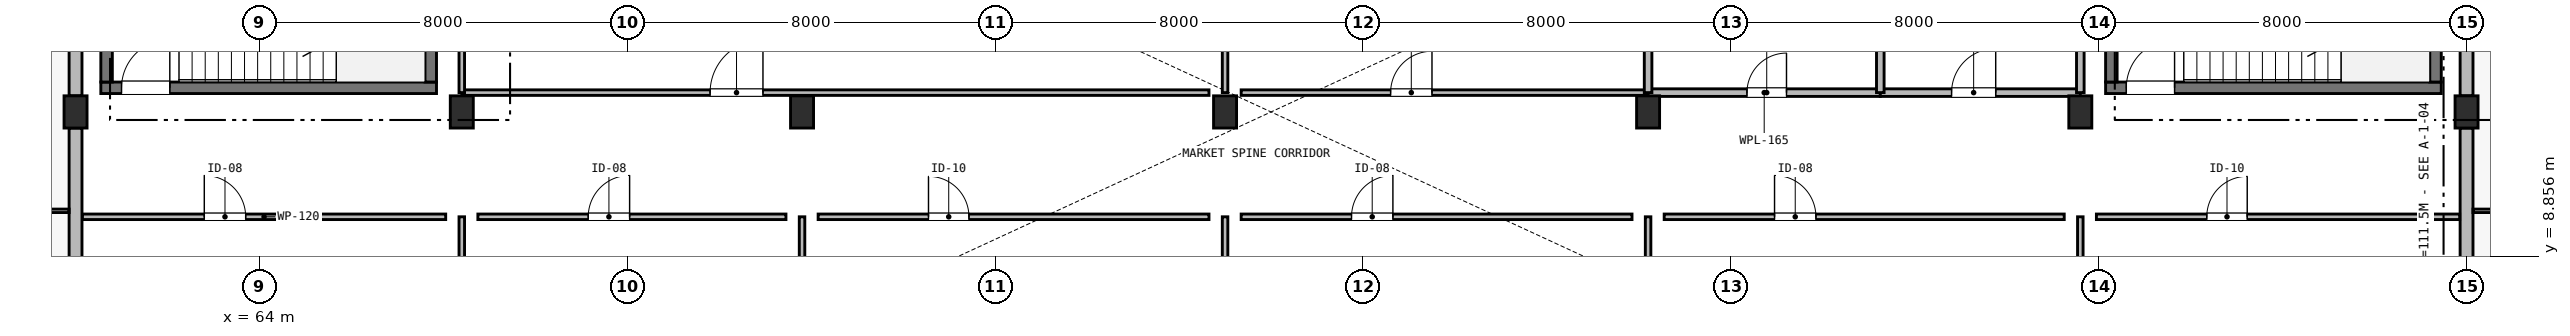
"""IFC4 building model, lengths in metres.
Left out: names, types, materials, properties, quantities, classifications, styles, units other than length and angle.
Written with IfcOpenShell. Run it as: python <this file> out.ifc"""

import sys

from ifc_helpers import new_model, si_unit, direction, frame, frame_2d, origin, origin_2d, place, context, subcontext, project, spatial, rectangle, extrude, element, fill, save


model = new_model("IFC4")
c1 = context("Model", 3, precision=1e-05, world=origin(), true_north=direction((0.0, 1.0)))
c2 = subcontext(c1, "Body", "Model", "MODEL_VIEW")
j1 = project(units=[si_unit("LENGTHUNIT", "METRE"), si_unit("PLANEANGLEUNIT", "RADIAN")], contexts=[c1])
p1 = place(None, origin())
s1 = spatial("IfcSite", under=j1, at=p1, CompositionType="ELEMENT")
p2 = place(p1, origin())
s2 = spatial("IfcBuilding", under=s1, at=p2, CompositionType="ELEMENT")
p3 = place(p2, origin())
s3 = spatial("IfcBuildingStorey", under=s2, at=p3, CompositionType="ELEMENT", Elevation=0.0)
p4 = place(p3, frame((60.55, 12.525, 0.0), z_axis=(0.0, 0.0, 1.0), x_axis=(1.0, 0.0, 0.0)))
e1 = element("IfcWall", 1, at=p4, inside=s3, PredefinedType="SHEAR", context=c2, shape_type="SweptSolid", body=[
    extrude(rectangle(XDim=7.3, YDim=0.25, at=frame_2d((3.65, 0.0))), origin(), (0.0, 0.0, 1.0), 4.5),
])
p5 = place(p4, frame((0.45, 0.0, 0.0)))
e2 = element("IfcOpeningElement", 2, at=p5, cuts=e1, PredefinedType="OPENING", context=c2, shape_type="SweptSolid", body=[
    extrude(rectangle(XDim=1.05, YDim=2.15, at=frame_2d((0.525, 1.075))), frame((0.0, 0.14, 0.0), z_axis=(0.0, -1.0, 0.0), x_axis=(1.0, 0.0, 0.0)), (0.0, 0.0, 1.0), 0.28),
])
for number, where, z_axis, x_axis in (
    (3, (60.675, 12.65, 0.0), (0.0, 0.0, 1.0), (0.0, 1.0, 0.0)),
    (4, (67.725, 12.65, 0.0), (0.0, 0.0, 1.0), (0.0, 1.0, 0.0)),
):
    element("IfcWall", number, at=place(p3, frame(where, z_axis=z_axis, x_axis=x_axis)), inside=s3, PredefinedType="SHEAR", context=c2, shape_type="SweptSolid", body=[
        extrude(rectangle(XDim=2.85, YDim=0.25, at=frame_2d((1.425, 0.0))), origin(), (0.0, 0.0, 1.0), 4.5),
    ])
p6 = place(p3, frame((104.15, 12.525, 0.0), z_axis=(0.0, 0.0, 1.0), x_axis=(1.0, 0.0, 0.0)))
e5 = element("IfcWall", 5, at=p6, inside=s3, PredefinedType="SHEAR", context=c2, shape_type="SweptSolid", body=[
    extrude(rectangle(XDim=7.3, YDim=0.25, at=frame_2d((3.65, 0.0))), origin(), (0.0, 0.0, 1.0), 4.5),
])
p7 = place(p6, frame((0.45, 0.0, 0.0)))
e6 = element("IfcOpeningElement", 6, at=p7, cuts=e5, PredefinedType="OPENING", context=c2, shape_type="SweptSolid", body=[
    extrude(rectangle(XDim=1.05, YDim=2.15, at=frame_2d((0.525, 1.075))), frame((0.0, 0.14, 0.0), z_axis=(0.0, -1.0, 0.0), x_axis=(1.0, 0.0, 0.0)), (0.0, 0.0, 1.0), 0.28),
])
for number, where, z_axis, x_axis in (
    (7, (104.275, 12.65, 0.0), (0.0, 0.0, 1.0), (0.0, 1.0, 0.0)),
    (8, (111.325, 12.65, 0.0), (0.0, 0.0, 1.0), (0.0, 1.0, 0.0)),
):
    element("IfcWall", number, at=place(p3, frame(where, z_axis=z_axis, x_axis=x_axis)), inside=s3, PredefinedType="SHEAR", context=c2, shape_type="SweptSolid", body=[
        extrude(rectangle(XDim=2.85, YDim=0.25, at=frame_2d((1.425, 0.0))), origin(), (0.0, 0.0, 1.0), 4.5),
    ])
for number, where, z_axis, x_axis in (
    (9, (60.0, 12.0, 0.0), (0.0, 0.0, 1.0), (1.0, 0.0, 0.0)),
    (10, (68.4, 12.0, 0.0), (0.0, 0.0, 1.0), (1.0, 0.0, 0.0)),
    (11, (75.8, 12.0, 0.0), (0.0, 0.0, 1.0), (1.0, 0.0, 0.0)),
    (12, (85.0, 12.0, 0.0), (0.0, 0.0, 1.0), (1.0, 0.0, 0.0)),
    (13, (94.2, 12.0, 0.0), (0.0, 0.0, 1.0), (1.0, 0.0, 0.0)),
    (14, (103.6, 12.0, 0.0), (0.0, 0.0, 1.0), (1.0, 0.0, 0.0)),
    (15, (112.0, 12.0, 0.0), (0.0, 0.0, 1.0), (1.0, 0.0, 0.0)),
):
    element("IfcColumn", number, at=place(p3, frame(where, z_axis=z_axis, x_axis=x_axis)), inside=s3, PredefinedType="COLUMN", context=c2, shape_type="SweptSolid", body=[
        extrude(rectangle(XDim=0.5, YDim=0.7, at=origin_2d()), origin(), (0.0, 0.0, 1.0), 4.5),
    ])
p8 = place(p3, frame((60.0, 0.35, 0.0), z_axis=(0.0, 0.0, 1.0), x_axis=(0.0, 1.0, 0.0)))
e16 = element("IfcWall", 16, at=p8, inside=s3, PredefinedType="SOLIDWALL", context=c2, shape_type="SweptSolid", body=[
    extrude(rectangle(XDim=11.3, YDim=0.28, at=frame_2d((5.65, 0.0))), origin(), (0.0, 0.0, 1.0), 3.59),
])
p9 = place(p8, frame((3.0, 0.0, 0.0)))
e17 = element("IfcOpeningElement", 17, at=p9, cuts=e16, PredefinedType="OPENING", context=c2, shape_type="SweptSolid", body=[
    extrude(rectangle(XDim=1.4, YDim=2.2, at=frame_2d((0.7, 1.1))), frame((0.0, 0.155, 0.0), z_axis=(0.0, -1.0, 0.0), x_axis=(1.0, 0.0, 0.0)), (0.0, 0.0, 1.0), 0.31),
])
p10 = place(p3, frame((60.0, 12.35, 0.0), z_axis=(0.0, 0.0, 1.0), x_axis=(0.0, 1.0, 0.0)))
e18 = element("IfcWall", 18, at=p10, inside=s3, PredefinedType="SOLIDWALL", context=c2, shape_type="SweptSolid", body=[
    extrude(rectangle(XDim=11.3, YDim=0.28, at=frame_2d((5.65, 0.0))), origin(), (0.0, 0.0, 1.0), 3.59),
])
p11 = place(p10, frame((5.3, 0.0, 0.42)))
e19 = element("IfcOpeningElement", 19, at=p11, cuts=e18, PredefinedType="OPENING", context=c2, shape_type="SweptSolid", body=[
    extrude(rectangle(XDim=0.7, YDim=2.14, at=frame_2d((0.35, 1.07))), frame((0.0, 0.155, 0.0), z_axis=(0.0, -1.0, 0.0), x_axis=(1.0, 0.0, 0.0)), (0.0, 0.0, 1.0), 0.31),
])
p12 = place(p3, frame((112.0, 11.65, 0.0), z_axis=(0.0, 0.0, 1.0), x_axis=(0.0, -1.0, 0.0)))
e20 = element("IfcWall", 20, at=p12, inside=s3, PredefinedType="SOLIDWALL", context=c2, shape_type="SweptSolid", body=[
    extrude(rectangle(XDim=11.3, YDim=0.28, at=frame_2d((5.65, 0.0))), origin(), (0.0, 0.0, 1.0), 3.59),
])
p13 = place(p12, frame((5.3, 0.0, 0.42)))
e21 = element("IfcOpeningElement", 21, at=p13, cuts=e20, PredefinedType="OPENING", context=c2, shape_type="SweptSolid", body=[
    extrude(rectangle(XDim=0.7, YDim=2.14, at=frame_2d((0.35, 1.07))), frame((0.0, 0.155, 0.0), z_axis=(0.0, -1.0, 0.0), x_axis=(1.0, 0.0, 0.0)), (0.0, 0.0, 1.0), 0.31),
])
p14 = place(p3, frame((112.0, 23.65, 0.0), z_axis=(0.0, 0.0, 1.0), x_axis=(0.0, -1.0, 0.0)))
e22 = element("IfcWall", 22, at=p14, inside=s3, PredefinedType="SOLIDWALL", context=c2, shape_type="SweptSolid", body=[
    extrude(rectangle(XDim=11.3, YDim=0.28, at=frame_2d((5.65, 0.0))), origin(), (0.0, 0.0, 1.0), 3.59),
])
p15 = place(p14, frame((5.3, 0.0, 0.42)))
e23 = element("IfcOpeningElement", 23, at=p15, cuts=e22, PredefinedType="OPENING", context=c2, shape_type="SweptSolid", body=[
    extrude(rectangle(XDim=0.7, YDim=2.14, at=frame_2d((0.35, 1.07))), frame((0.0, 0.155, 0.0), z_axis=(0.0, -1.0, 0.0), x_axis=(1.0, 0.0, 0.0)), (0.0, 0.0, 1.0), 0.31),
])
p16 = place(p3, frame((60.15, 9.72, 0.0), z_axis=(0.0, 0.0, 1.0), x_axis=(1.0, 0.0, 0.0)))
e24 = element("IfcWall", 24, at=p16, inside=s3, PredefinedType="PARTITIONING", context=c2, shape_type="SweptSolid", body=[
    extrude(rectangle(XDim=7.9, YDim=0.12, at=frame_2d((3.95, 0.0))), origin(), (0.0, 0.0, 1.0), 4.23),
])
p17 = place(p16, frame((2.65, 0.0, 0.0)))
e25 = element("IfcOpeningElement", 25, at=p17, cuts=e24, PredefinedType="OPENING", context=c2, shape_type="SweptSolid", body=[
    extrude(rectangle(XDim=0.9, YDim=2.1, at=frame_2d((0.45, 1.05))), frame((0.0, 0.075, 0.0), z_axis=(0.0, -1.0, 0.0), x_axis=(1.0, 0.0, 0.0)), (0.0, 0.0, 1.0), 0.15),
])
p18 = place(p3, frame((68.75, 9.72, 0.0), z_axis=(0.0, 0.0, 1.0), x_axis=(1.0, 0.0, 0.0)))
e26 = element("IfcWall", 26, at=p18, inside=s3, PredefinedType="PARTITIONING", context=c2, shape_type="SweptSolid", body=[
    extrude(rectangle(XDim=6.7, YDim=0.12, at=frame_2d((3.35, 0.0))), origin(), (0.0, 0.0, 1.0), 4.23),
])
p19 = place(p18, frame((2.4, 0.0, 0.0)))
e27 = element("IfcOpeningElement", 27, at=p19, cuts=e26, PredefinedType="OPENING", context=c2, shape_type="SweptSolid", body=[
    extrude(rectangle(XDim=0.9, YDim=2.1, at=frame_2d((0.45, 1.05))), frame((0.0, 0.075, 0.0), z_axis=(0.0, -1.0, 0.0), x_axis=(1.0, 0.0, 0.0)), (0.0, 0.0, 1.0), 0.15),
])
p20 = place(p3, frame((76.15, 9.72, 0.0), z_axis=(0.0, 0.0, 1.0), x_axis=(1.0, 0.0, 0.0)))
e28 = element("IfcWall", 28, at=p20, inside=s3, PredefinedType="PARTITIONING", context=c2, shape_type="SweptSolid", body=[
    extrude(rectangle(XDim=8.5, YDim=0.12, at=frame_2d((4.25, 0.0))), origin(), (0.0, 0.0, 1.0), 4.23),
])
p21 = place(p20, frame((2.4, 0.0, 0.0)))
e29 = element("IfcOpeningElement", 29, at=p21, cuts=e28, PredefinedType="OPENING", context=c2, shape_type="SweptSolid", body=[
    extrude(rectangle(XDim=0.88, YDim=2.1, at=frame_2d((0.44, 1.05))), frame((0.0, 0.075, 0.0), z_axis=(0.0, -1.0, 0.0), x_axis=(1.0, 0.0, 0.0)), (0.0, 0.0, 1.0), 0.15),
])
p22 = place(p3, frame((85.35, 9.72, 0.0), z_axis=(0.0, 0.0, 1.0), x_axis=(1.0, 0.0, 0.0)))
e30 = element("IfcWall", 30, at=p22, inside=s3, PredefinedType="PARTITIONING", context=c2, shape_type="SweptSolid", body=[
    extrude(rectangle(XDim=8.5, YDim=0.12, at=frame_2d((4.25, 0.0))), origin(), (0.0, 0.0, 1.0), 4.23),
])
p23 = place(p22, frame((2.4, 0.0, 0.0)))
e31 = element("IfcOpeningElement", 31, at=p23, cuts=e30, PredefinedType="OPENING", context=c2, shape_type="SweptSolid", body=[
    extrude(rectangle(XDim=0.9, YDim=2.1, at=frame_2d((0.45, 1.05))), frame((0.0, 0.075, 0.0), z_axis=(0.0, -1.0, 0.0), x_axis=(1.0, 0.0, 0.0)), (0.0, 0.0, 1.0), 0.15),
])
p24 = place(p3, frame((94.55, 9.72, 0.0), z_axis=(0.0, 0.0, 1.0), x_axis=(1.0, 0.0, 0.0)))
e32 = element("IfcWall", 32, at=p24, inside=s3, PredefinedType="PARTITIONING", context=c2, shape_type="SweptSolid", body=[
    extrude(rectangle(XDim=8.7, YDim=0.12, at=frame_2d((4.35, 0.0))), origin(), (0.0, 0.0, 1.0), 4.23),
])
p25 = place(p24, frame((2.4, 0.0, 0.0)))
e33 = element("IfcOpeningElement", 33, at=p25, cuts=e32, PredefinedType="OPENING", context=c2, shape_type="SweptSolid", body=[
    extrude(rectangle(XDim=0.9, YDim=2.1, at=frame_2d((0.45, 1.05))), frame((0.0, 0.075, 0.0), z_axis=(0.0, -1.0, 0.0), x_axis=(1.0, 0.0, 0.0)), (0.0, 0.0, 1.0), 0.15),
])
p26 = place(p3, frame((103.95, 9.72, 0.0), z_axis=(0.0, 0.0, 1.0), x_axis=(1.0, 0.0, 0.0)))
e34 = element("IfcWall", 34, at=p26, inside=s3, PredefinedType="PARTITIONING", context=c2, shape_type="SweptSolid", body=[
    extrude(rectangle(XDim=7.9, YDim=0.12, at=frame_2d((3.95, 0.0))), origin(), (0.0, 0.0, 1.0), 4.23),
])
p27 = place(p26, frame((2.4, 0.0, 0.0)))
e35 = element("IfcOpeningElement", 35, at=p27, cuts=e34, PredefinedType="OPENING", context=c2, shape_type="SweptSolid", body=[
    extrude(rectangle(XDim=0.88, YDim=2.1, at=frame_2d((0.44, 1.05))), frame((0.0, 0.075, 0.0), z_axis=(0.0, -1.0, 0.0), x_axis=(1.0, 0.0, 0.0)), (0.0, 0.0, 1.0), 0.15),
])
for number, where, z_axis, x_axis in (
    (36, (68.4, 0.12, 0.0), (0.0, 0.0, 1.0), (0.0, 1.0, 0.0)),
    (37, (75.8, 0.12, 0.0), (0.0, 0.0, 1.0), (0.0, 1.0, 0.0)),
    (38, (85.0, 0.12, 0.0), (0.0, 0.0, 1.0), (0.0, 1.0, 0.0)),
    (39, (94.2, 0.12, 0.0), (0.0, 0.0, 1.0), (0.0, 1.0, 0.0)),
    (40, (103.6, 0.12, 0.0), (0.0, 0.0, 1.0), (0.0, 1.0, 0.0)),
):
    element("IfcWall", number, at=place(p3, frame(where, z_axis=z_axis, x_axis=x_axis)), inside=s3, PredefinedType="PARTITIONING", context=c2, shape_type="SweptSolid", body=[
        extrude(rectangle(XDim=9.6, YDim=0.12, at=frame_2d((4.8, 0.0))), origin(), (0.0, 0.0, 1.0), 3.6),
    ])
p28 = place(p3, frame((68.4, 12.42, 0.0), z_axis=(0.0, 0.0, 1.0), x_axis=(1.0, 0.0, 0.0)))
e41 = element("IfcWall", 41, at=p28, inside=s3, PredefinedType="PARTITIONING", context=c2, shape_type="SweptSolid", body=[
    extrude(rectangle(XDim=16.25, YDim=0.12, at=frame_2d((8.125, 0.0))), origin(), (0.0, 0.0, 1.0), 4.23),
])
p29 = place(p28, frame((5.4, 0.0, 0.0)))
e42 = element("IfcOpeningElement", 42, at=p29, cuts=e41, PredefinedType="OPENING", context=c2, shape_type="SweptSolid", body=[
    extrude(rectangle(XDim=1.15, YDim=2.15, at=frame_2d((0.575, 1.075))), frame((0.0, 0.075, 0.0), z_axis=(0.0, -1.0, 0.0), x_axis=(1.0, 0.0, 0.0)), (0.0, 0.0, 1.0), 0.15),
])
p30 = place(p3, frame((85.35, 12.42, 0.0), z_axis=(0.0, 0.0, 1.0), x_axis=(1.0, 0.0, 0.0)))
e43 = element("IfcWall", 43, at=p30, inside=s3, PredefinedType="PARTITIONING", context=c2, shape_type="SweptSolid", body=[
    extrude(rectangle(XDim=8.85, YDim=0.12, at=frame_2d((4.425, 0.0))), origin(), (0.0, 0.0, 1.0), 4.23),
])
p31 = place(p30, frame((3.25, 0.0, 0.0)))
e44 = element("IfcOpeningElement", 44, at=p31, cuts=e43, PredefinedType="OPENING", context=c2, shape_type="SweptSolid", body=[
    extrude(rectangle(XDim=0.9, YDim=2.1, at=frame_2d((0.45, 1.05))), frame((0.0, 0.075, 0.0), z_axis=(0.0, -1.0, 0.0), x_axis=(1.0, 0.0, 0.0)), (0.0, 0.0, 1.0), 0.15),
])
p32 = place(p3, frame((94.2, 12.42, 0.0), z_axis=(0.0, 0.0, 1.0), x_axis=(1.0, 0.0, 0.0)))
e45 = element("IfcWall", 45, at=p32, inside=s3, PredefinedType="PLUMBINGWALL", context=c2, shape_type="SweptSolid", body=[
    extrude(rectangle(XDim=5.05, YDim=0.165, at=frame_2d((2.525, 0.0))), origin(), (0.0, 0.0, 1.0), 4.23),
])
p33 = place(p32, frame((2.15, 0.0, 0.0)))
e46 = element("IfcOpeningElement", 46, at=p33, cuts=e45, PredefinedType="OPENING", context=c2, shape_type="SweptSolid", body=[
    extrude(rectangle(XDim=0.86, YDim=2.1, at=frame_2d((0.43, 1.05))), frame((0.0, 0.097, 0.0), z_axis=(0.0, -1.0, 0.0), x_axis=(1.0, 0.0, 0.0)), (0.0, 0.0, 1.0), 0.195),
])
p34 = place(p3, frame((99.25, 12.42, 0.0), z_axis=(0.0, 0.0, 1.0), x_axis=(1.0, 0.0, 0.0)))
e47 = element("IfcWall", 47, at=p34, inside=s3, PredefinedType="PLUMBINGWALL", context=c2, shape_type="SweptSolid", body=[
    extrude(rectangle(XDim=4.35, YDim=0.165, at=frame_2d((2.175, 0.0))), origin(), (0.0, 0.0, 1.0), 4.23),
])
p35 = place(p34, frame((1.55, 0.0, 0.0)))
e48 = element("IfcOpeningElement", 48, at=p35, cuts=e47, PredefinedType="OPENING", context=c2, shape_type="SweptSolid", body=[
    extrude(rectangle(XDim=0.96, YDim=2.12, at=frame_2d((0.48, 1.06))), frame((0.0, 0.097, 0.0), z_axis=(0.0, -1.0, 0.0), x_axis=(1.0, 0.0, 0.0)), (0.0, 0.0, 1.0), 0.195),
])
p36 = place(p3, frame((68.4, 12.42, 0.0), z_axis=(0.0, 0.0, 1.0), x_axis=(0.0, 1.0, 0.0)))
e49 = element("IfcWall", 49, at=p36, inside=s3, PredefinedType="PARTITIONING", context=c2, shape_type="SweptSolid", body=[
    extrude(rectangle(XDim=11.54, YDim=0.12, at=frame_2d((5.77, 0.0))), origin(), (0.0, 0.0, 1.0), 3.6),
])
p37 = place(p36, frame((4.25, 0.0, 0.0)))
e50 = element("IfcOpeningElement", 50, at=p37, cuts=e49, PredefinedType="OPENING", context=c2, shape_type="SweptSolid", body=[
    extrude(rectangle(XDim=1.18, YDim=2.15, at=frame_2d((0.59, 1.075))), frame((0.0, 0.075, 0.0), z_axis=(0.0, -1.0, 0.0), x_axis=(1.0, 0.0, 0.0)), (0.0, 0.0, 1.0), 0.15),
])
p38 = place(p3, frame((85.0, 12.42, 0.0), z_axis=(0.0, 0.0, 1.0), x_axis=(0.0, 1.0, 0.0)))
e51 = element("IfcWall", 51, at=p38, inside=s3, PredefinedType="PARTITIONING", context=c2, shape_type="SweptSolid", body=[
    extrude(rectangle(XDim=11.54, YDim=0.12, at=frame_2d((5.77, 0.0))), origin(), (0.0, 0.0, 1.0), 3.6),
])
p39 = place(p3, frame((94.2, 12.42, 0.0), z_axis=(0.0, 0.0, 1.0), x_axis=(0.0, 1.0, 0.0)))
e52 = element("IfcWall", 52, at=p39, inside=s3, PredefinedType="PLUMBINGWALL", context=c2, shape_type="SweptSolid", body=[
    extrude(rectangle(XDim=11.54, YDim=0.165, at=frame_2d((5.77, 0.0))), origin(), (0.0, 0.0, 1.0), 3.6),
])
p40 = place(p3, frame((99.25, 12.42, 0.0), z_axis=(0.0, 0.0, 1.0), x_axis=(0.0, 1.0, 0.0)))
e53 = element("IfcWall", 53, at=p40, inside=s3, PredefinedType="PLUMBINGWALL", context=c2, shape_type="SweptSolid", body=[
    extrude(rectangle(XDim=11.54, YDim=0.165, at=frame_2d((5.77, 0.0))), origin(), (0.0, 0.0, 1.0), 4.23),
])
p41 = place(p3, frame((103.6, 12.42, 0.0), z_axis=(0.0, 0.0, 1.0), x_axis=(0.0, 1.0, 0.0)))
e54 = element("IfcWall", 54, at=p41, inside=s3, PredefinedType="PLUMBINGWALL", context=c2, shape_type="SweptSolid", body=[
    extrude(rectangle(XDim=11.54, YDim=0.165, at=frame_2d((5.77, 0.0))), origin(), (0.0, 0.0, 1.0), 3.6),
])
p42 = place(p17, origin())
e55 = element("IfcDoor", 55, at=p42, inside=s3, OperationType="SINGLE_SWING_LEFT", PredefinedType="DOOR", context=c2, shape_type="SweptSolid", body=[
    extrude(rectangle(XDim=0.9, YDim=2.1, at=frame_2d((0.45, 1.05))), frame((0.0, 0.025, 0.0), z_axis=(0.0, -1.0, 0.0), x_axis=(1.0, 0.0, 0.0)), (0.0, 0.0, 1.0), 0.05),
])
fill(e25, e55)
p43 = place(p19, origin())
e56 = element("IfcDoor", 56, at=p43, inside=s3, OperationType="SINGLE_SWING_RIGHT", PredefinedType="DOOR", context=c2, shape_type="SweptSolid", body=[
    extrude(rectangle(XDim=0.9, YDim=2.1, at=frame_2d((0.45, 1.05))), frame((0.0, 0.025, 0.0), z_axis=(0.0, -1.0, 0.0), x_axis=(1.0, 0.0, 0.0)), (0.0, 0.0, 1.0), 0.05),
])
fill(e27, e56)
p44 = place(p21, origin())
e57 = element("IfcDoor", 57, at=p44, inside=s3, OperationType="SINGLE_SWING_LEFT", PredefinedType="DOOR", context=c2, shape_type="SweptSolid", body=[
    extrude(rectangle(XDim=0.88, YDim=2.1, at=frame_2d((0.44, 1.05))), frame((0.0, 0.025, 0.0), z_axis=(0.0, -1.0, 0.0), x_axis=(1.0, 0.0, 0.0)), (0.0, 0.0, 1.0), 0.05),
])
fill(e29, e57)
p45 = place(p23, origin())
e58 = element("IfcDoor", 58, at=p45, inside=s3, OperationType="SINGLE_SWING_RIGHT", PredefinedType="DOOR", context=c2, shape_type="SweptSolid", body=[
    extrude(rectangle(XDim=0.9, YDim=2.1, at=frame_2d((0.45, 1.05))), frame((0.0, 0.025, 0.0), z_axis=(0.0, -1.0, 0.0), x_axis=(1.0, 0.0, 0.0)), (0.0, 0.0, 1.0), 0.05),
])
fill(e31, e58)
p46 = place(p25, origin())
e59 = element("IfcDoor", 59, at=p46, inside=s3, OperationType="SINGLE_SWING_LEFT", PredefinedType="DOOR", context=c2, shape_type="SweptSolid", body=[
    extrude(rectangle(XDim=0.9, YDim=2.1, at=frame_2d((0.45, 1.05))), frame((0.0, 0.025, 0.0), z_axis=(0.0, -1.0, 0.0), x_axis=(1.0, 0.0, 0.0)), (0.0, 0.0, 1.0), 0.05),
])
fill(e33, e59)
p47 = place(p27, origin())
e60 = element("IfcDoor", 60, at=p47, inside=s3, OperationType="SINGLE_SWING_RIGHT", PredefinedType="DOOR", context=c2, shape_type="SweptSolid", body=[
    extrude(rectangle(XDim=0.88, YDim=2.1, at=frame_2d((0.44, 1.05))), frame((0.0, 0.025, 0.0), z_axis=(0.0, -1.0, 0.0), x_axis=(1.0, 0.0, 0.0)), (0.0, 0.0, 1.0), 0.05),
])
fill(e35, e60)
p48 = place(p29, origin())
e61 = element("IfcDoor", 61, at=p48, inside=s3, OperationType="SINGLE_SWING_RIGHT", PredefinedType="DOOR", context=c2, shape_type="SweptSolid", body=[
    extrude(rectangle(XDim=1.15, YDim=2.15, at=frame_2d((0.575, 1.075))), frame((0.0, 0.025, 0.0), z_axis=(0.0, -1.0, 0.0), x_axis=(1.0, 0.0, 0.0)), (0.0, 0.0, 1.0), 0.05),
])
fill(e42, e61)
p49 = place(p31, origin())
e62 = element("IfcDoor", 62, at=p49, inside=s3, OperationType="SINGLE_SWING_RIGHT", PredefinedType="DOOR", context=c2, shape_type="SweptSolid", body=[
    extrude(rectangle(XDim=0.9, YDim=2.1, at=frame_2d((0.45, 1.05))), frame((0.0, 0.025, 0.0), z_axis=(0.0, -1.0, 0.0), x_axis=(1.0, 0.0, 0.0)), (0.0, 0.0, 1.0), 0.05),
])
fill(e44, e62)
p50 = place(p33, origin())
e63 = element("IfcDoor", 63, at=p50, inside=s3, OperationType="SINGLE_SWING_RIGHT", PredefinedType="DOOR", context=c2, shape_type="SweptSolid", body=[
    extrude(rectangle(XDim=0.86, YDim=2.1, at=frame_2d((0.43, 1.05))), frame((0.0, 0.025, 0.0), z_axis=(0.0, -1.0, 0.0), x_axis=(1.0, 0.0, 0.0)), (0.0, 0.0, 1.0), 0.05),
])
fill(e46, e63)
p51 = place(p35, origin())
e64 = element("IfcDoor", 64, at=p51, inside=s3, OperationType="SINGLE_SWING_RIGHT", PredefinedType="DOOR", context=c2, shape_type="SweptSolid", body=[
    extrude(rectangle(XDim=0.96, YDim=2.12, at=frame_2d((0.48, 1.06))), frame((0.0, 0.025, 0.0), z_axis=(0.0, -1.0, 0.0), x_axis=(1.0, 0.0, 0.0)), (0.0, 0.0, 1.0), 0.05),
])
fill(e48, e64)
p52 = place(p5, origin())
e65 = element("IfcDoor", 65, at=p52, inside=s3, OperationType="SINGLE_SWING_RIGHT", PredefinedType="DOOR", context=c2, shape_type="SweptSolid", body=[
    extrude(rectangle(XDim=1.05, YDim=2.15, at=frame_2d((0.525, 1.075))), frame((0.0, 0.025, 0.0), z_axis=(0.0, -1.0, 0.0), x_axis=(1.0, 0.0, 0.0)), (0.0, 0.0, 1.0), 0.05),
])
fill(e2, e65)
p53 = place(p7, origin())
e66 = element("IfcDoor", 66, at=p53, inside=s3, OperationType="SINGLE_SWING_RIGHT", PredefinedType="DOOR", context=c2, shape_type="SweptSolid", body=[
    extrude(rectangle(XDim=1.05, YDim=2.15, at=frame_2d((0.525, 1.075))), frame((0.0, 0.025, 0.0), z_axis=(0.0, -1.0, 0.0), x_axis=(1.0, 0.0, 0.0)), (0.0, 0.0, 1.0), 0.05),
])
fill(e6, e66)
save(model, sys.argv[1])
